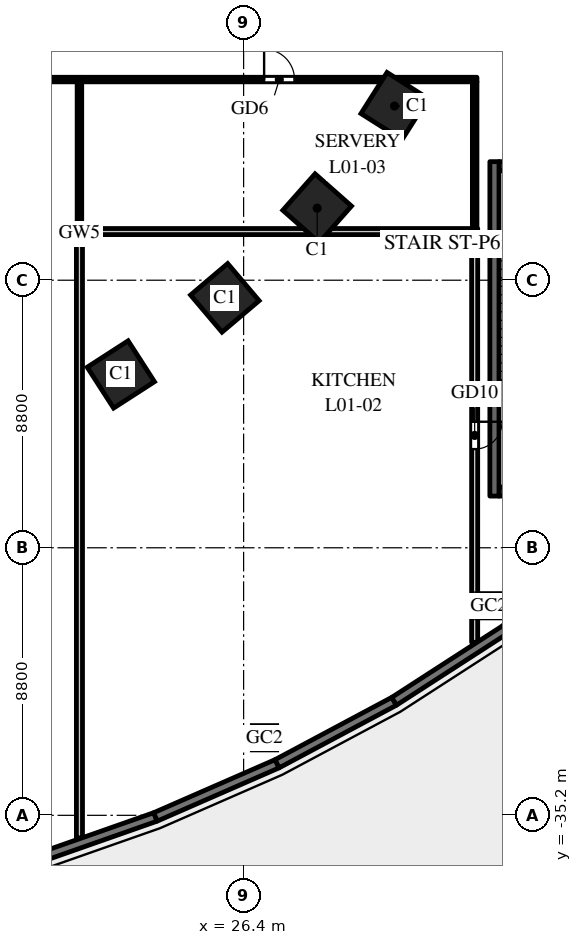
"""IFC4 building model, lengths in metres.
Left out: names, types, materials, properties, quantities, classifications, styles, units other than length and angle.
Written with IfcOpenShell. Run it as: python <this file> out.ifc"""

import sys

from ifc_helpers import new_model, si_unit, direction, frame, frame_2d, origin, origin_2d, place, context, subcontext, project, spatial, rectangle, hollow_rectangle, i_section, extrude, element, fill, save


model = new_model("IFC4")
c1 = context("Model", 3, precision=1e-05, world=origin(), true_north=direction((0.0, 1.0)))
c2 = subcontext(c1, "Body", "Model", "MODEL_VIEW")
j1 = project(units=[si_unit("LENGTHUNIT", "METRE"), si_unit("PLANEANGLEUNIT", "RADIAN")], contexts=[c1])
p1 = place(None, origin())
s1 = spatial("IfcSite", under=j1, at=p1, CompositionType="ELEMENT")
p2 = place(p1, origin())
s2 = spatial("IfcBuilding", under=s1, at=p2, CompositionType="ELEMENT")
p3 = place(p2, frame((0.0, 0.0, 7.5)))
s3 = spatial("IfcBuildingStorey", under=s2, at=p3, CompositionType="ELEMENT", Elevation=7.5)
for number, where, z_axis, x_axis in (
    (1, (22.362, -20.7, 0.0), (0.0, 0.0, 1.0), (0.84, 0.542, 0.0)),
    (2, (25.783, -18.18, 0.0), (0.0, 0.0, 1.0), (0.763, 0.646, 0.0)),
    (3, (28.819, -15.23, 0.0), (0.0, 0.0, 1.0), (0.663, 0.749, 0.0)),
    (4, (31.365, -11.871, 0.0), (0.0, 0.0, 1.0), (0.535, 0.845, 0.0)),
):
    element("IfcColumn", number, at=place(p3, frame(where, z_axis=z_axis, x_axis=x_axis)), inside=s3, PredefinedType="COLUMN", context=c2, shape_type="SweptSolid", body=[
        extrude(rectangle(XDim=1.6, YDim=1.6, at=origin_2d()), origin(), (0.0, 0.0, 1.0), 6.0),
    ])
for number, where, z_axis, x_axis in (
    (5, (27.087, -32.648, 0.0), (0.0, 0.0, 1.0), (1.0, 0.0, 0.0)),
    (6, (34.465, -28.307, 0.0), (0.0, 0.0, 1.0), (1.0, 0.0, 0.0)),
):
    element("IfcColumn", number, at=place(p3, frame(where, z_axis=z_axis, x_axis=x_axis)), inside=s3, PredefinedType="COLUMN", context=c2, shape_type="SweptSolid", body=[
        extrude(hollow_rectangle(XDim=0.8, YDim=0.8, WallThickness=0.04, at=origin_2d()), origin(), (0.0, 0.0, 1.0), 6.0),
    ])
p4 = place(p3, frame((21.0, -16.065, 0.0), z_axis=(0.0, 0.0, 1.0), x_axis=(0.0, -1.0, 0.0)))
e7 = element("IfcWall", 7, at=p4, inside=s3, PredefinedType="PARTITIONING", context=c2, shape_type="SweptSolid", body=[
    extrude(rectangle(XDim=19.876, YDim=0.2, at=frame_2d((9.938, 0.0))), origin(), (0.0, 0.0, 1.0), 4.75),
])
p5 = place(p3, frame((21.0, -11.075, 0.0), z_axis=(0.0, 0.0, 1.0), x_axis=(0.0, -1.0, 0.0)))
e8 = element("IfcWall", 8, at=p5, inside=s3, PredefinedType="PARTITIONING", context=c2, shape_type="SweptSolid", body=[
    extrude(rectangle(XDim=4.835, YDim=0.15, at=frame_2d((2.417, 0.0))), origin(), (0.0, 0.0, 1.0), 4.7),
])
p6 = place(p3, frame((-30.075, -11.0, 0.0), z_axis=(0.0, 0.0, 1.0), x_axis=(1.0, 0.0, 0.0)))
e9 = element("IfcWall", 9, at=p6, inside=s3, PredefinedType="PARTITIONING", context=c2, shape_type="SweptSolid", body=[
    extrude(rectangle(XDim=51.15, YDim=0.15, at=frame_2d((25.575, 0.0))), origin(), (0.0, 0.0, 1.0), 4.7),
])
p7 = place(p6, frame((24.875, 0.0, 0.0)))
e10 = element("IfcOpeningElement", 10, at=p7, cuts=e9, PredefinedType="OPENING", context=c2, shape_type="SweptSolid", body=[
    extrude(rectangle(XDim=1.4, YDim=2.1, at=frame_2d((0.7, 1.05))), frame((0.0, 0.085, 0.0), z_axis=(0.0, -1.0, 0.0), x_axis=(1.0, 0.0, 0.0)), (0.0, 0.0, 1.0), 0.17),
])
p8 = place(p3, frame((21.1, -16.0, 0.0), z_axis=(0.0, 0.0, 1.0), x_axis=(1.0, 0.0, 0.0)))
e11 = element("IfcWall", 11, at=p8, inside=s3, PredefinedType="PARTITIONING", context=c2, shape_type="SweptSolid", body=[
    extrude(rectangle(XDim=12.8, YDim=0.2, at=frame_2d((6.4, 0.0))), origin(), (0.0, 0.0, 1.0), 4.85),
])
p9 = place(p3, frame((34.0, -15.9, 0.0), z_axis=(0.0, 0.0, 1.0), x_axis=(0.0, -1.0, 0.0)))
e12 = element("IfcWall", 12, at=p9, inside=s3, PredefinedType="PARTITIONING", context=c2, shape_type="SweptSolid", body=[
    extrude(rectangle(XDim=13.61, YDim=0.2, at=frame_2d((6.805, 0.0))), origin(), (0.0, 0.0, 1.0), 4.75),
])
p10 = place(p9, frame((6.355, 0.0, 0.0)))
e13 = element("IfcOpeningElement", 13, at=p10, cuts=e12, PredefinedType="OPENING", context=c2, shape_type="SweptSolid", body=[
    extrude(rectangle(XDim=0.9, YDim=2.1, at=frame_2d((0.45, 1.05))), frame((0.0, 0.11, 0.0), z_axis=(0.0, -1.0, 0.0), x_axis=(1.0, 0.0, 0.0)), (0.0, 0.0, 1.0), 0.22),
])
p11 = place(p3, frame((21.074, -11.0, 0.0), z_axis=(0.0, 0.0, 1.0), x_axis=(1.0, 0.0, 0.0)))
e14 = element("IfcWall", 14, at=p11, inside=s3, PredefinedType="PARTITIONING", context=c2, shape_type="SweptSolid", body=[
    extrude(rectangle(XDim=13.001, YDim=0.15, at=frame_2d((6.5, 0.0))), origin(), (0.0, 0.0, 1.0), 4.75),
])
p12 = place(p11, frame((6.001, 0.0, 0.0)))
e15 = element("IfcOpeningElement", 15, at=p12, cuts=e14, PredefinedType="OPENING", context=c2, shape_type="SweptSolid", body=[
    extrude(rectangle(XDim=1.0, YDim=2.1, at=frame_2d((0.5, 1.05))), frame((0.0, 0.085, 0.0), z_axis=(0.0, -1.0, 0.0), x_axis=(1.0, 0.0, 0.0)), (0.0, 0.0, 1.0), 0.17),
])
p13 = place(p3, frame((34.0, -11.075, 0.0), z_axis=(0.0, 0.0, 1.0), x_axis=(0.0, -1.0, 0.0)))
e16 = element("IfcWall", 16, at=p13, inside=s3, PredefinedType="PARTITIONING", context=c2, shape_type="SweptSolid", body=[
    extrude(rectangle(XDim=4.825, YDim=0.15, at=frame_2d((2.413, 0.0))), origin(), (0.0, 0.0, 1.0), 4.75),
])
p14 = place(p3, frame((19.379, -36.699, 0.0), z_axis=(0.0, 0.0, 1.0), x_axis=(0.943526738033, 0.331296384853, 0.0)))
e17 = element("IfcWall", 17, at=p14, inside=s3, PredefinedType="SOLIDWALL", context=c2, shape_type="SweptSolid", body=[
    extrude(rectangle(XDim=4.368, YDim=0.3, at=frame_2d((2.184, 0.0))), origin(), (0.0, 0.0, 1.0), 5.75),
])
p15 = place(p14, frame((0.984, 0.0, 1.0)))
e18 = element("IfcOpeningElement", 18, at=p15, cuts=e17, PredefinedType="OPENING", context=c2, shape_type="SweptSolid", body=[
    extrude(rectangle(XDim=2.4, YDim=3.0, at=frame_2d((1.2, 1.5))), frame((0.0, 0.16, 0.0), z_axis=(0.0, -1.0, 0.0), x_axis=(1.0, 0.0, 0.0)), (0.0, 0.0, 1.0), 0.32),
])
p16 = place(p3, frame((23.5, -35.252, 0.0), z_axis=(0.0, 0.0, 1.0), x_axis=(0.916336904548, 0.400408138483, 0.0)))
e19 = element("IfcWall", 19, at=p16, inside=s3, PredefinedType="SOLIDWALL", context=c2, shape_type="SweptSolid", body=[
    extrude(rectangle(XDim=4.366, YDim=0.3, at=frame_2d((2.183, 0.0))), origin(), (0.0, 0.0, 1.0), 5.75),
])
p17 = place(p16, frame((0.983, 0.0, 1.0)))
e20 = element("IfcOpeningElement", 20, at=p17, cuts=e19, PredefinedType="OPENING", context=c2, shape_type="SweptSolid", body=[
    extrude(rectangle(XDim=2.4, YDim=3.0, at=frame_2d((1.2, 1.5))), frame((0.0, 0.16, 0.0), z_axis=(0.0, -1.0, 0.0), x_axis=(1.0, 0.0, 0.0)), (0.0, 0.0, 1.0), 0.32),
])
p18 = place(p3, frame((27.501, -33.504, 0.0), z_axis=(0.0, 0.0, 1.0), x_axis=(0.882159305704, 0.47095112205, 0.0)))
e21 = element("IfcWall", 21, at=p18, inside=s3, PredefinedType="SOLIDWALL", context=c2, shape_type="SweptSolid", body=[
    extrude(rectangle(XDim=4.365, YDim=0.3, at=frame_2d((2.182, 0.0))), origin(), (0.0, 0.0, 1.0), 5.75),
])
p19 = place(p18, frame((0.982, 0.0, 1.0)))
e22 = element("IfcOpeningElement", 22, at=p19, cuts=e21, PredefinedType="OPENING", context=c2, shape_type="SweptSolid", body=[
    extrude(rectangle(XDim=2.4, YDim=3.0, at=frame_2d((1.2, 1.5))), frame((0.0, 0.16, 0.0), z_axis=(0.0, -1.0, 0.0), x_axis=(1.0, 0.0, 0.0)), (0.0, 0.0, 1.0), 0.32),
])
p20 = place(p3, frame((31.352, -31.448, 0.0), z_axis=(0.0, 0.0, 1.0), x_axis=(0.840047348843, 0.542513088969, 0.0)))
e23 = element("IfcWall", 23, at=p20, inside=s3, PredefinedType="SOLIDWALL", context=c2, shape_type="SweptSolid", body=[
    extrude(rectangle(XDim=4.362, YDim=0.3, at=frame_2d((2.181, 0.0))), origin(), (0.0, 0.0, 1.0), 5.75),
])
p21 = place(p20, frame((0.671, 0.0, 1.0)))
e24 = element("IfcOpeningElement", 24, at=p21, cuts=e23, PredefinedType="OPENING", context=c2, shape_type="SweptSolid", body=[
    extrude(rectangle(XDim=2.4, YDim=3.0, at=frame_2d((1.2, 1.5))), frame((0.0, 0.16, 0.0), z_axis=(0.0, -1.0, 0.0), x_axis=(1.0, 0.0, 0.0)), (0.0, 0.0, 1.0), 0.32),
])
p22 = place(p3, frame((34.65, -24.7, 0.0), z_axis=(0.0, 0.0, 1.0), x_axis=(0.0, 1.0, 0.0)))
e25 = element("IfcWall", 25, at=p22, inside=s3, PredefinedType="SHEAR", context=c2, shape_type="SweptSolid", body=[
    extrude(rectangle(XDim=11.0, YDim=0.3, at=frame_2d((5.5, 0.0))), origin(), (0.0, 0.0, 1.0), 5.75),
])
p23 = place(p3, frame((34.8, -24.55, 0.0), z_axis=(0.0, 0.0, 1.0), x_axis=(1.0, 0.0, 0.0)))
e26 = element("IfcWall", 26, at=p23, inside=s3, PredefinedType="SHEAR", context=c2, shape_type="SweptSolid", body=[
    extrude(rectangle(XDim=4.95, YDim=0.3, at=frame_2d((2.475, 0.0))), origin(), (0.0, 0.0, 1.0), 5.75),
])
p24 = place(p3, frame((34.8, -13.85, 0.0), z_axis=(0.0, 0.0, 1.0), x_axis=(1.0, 0.0, 0.0)))
e27 = element("IfcWall", 27, at=p24, inside=s3, PredefinedType="SHEAR", context=c2, shape_type="SweptSolid", body=[
    extrude(rectangle(XDim=4.95, YDim=0.3, at=frame_2d((2.475, 0.0))), origin(), (0.0, 0.0, 1.0), 5.75),
])
p25 = place(p24, frame((1.475, 0.0, 0.0)))
e28 = element("IfcOpeningElement", 28, at=p25, cuts=e27, PredefinedType="OPENING", context=c2, shape_type="SweptSolid", body=[
    extrude(rectangle(XDim=2.0, YDim=2.1, at=frame_2d((1.0, 1.05))), frame((0.0, 0.16, 0.0), z_axis=(0.0, -1.0, 0.0), x_axis=(1.0, 0.0, 0.0)), (0.0, 0.0, 1.0), 0.32),
])
p26 = place(p2, origin())
s4 = spatial("IfcBuildingStorey", under=s2, at=p26, CompositionType="ELEMENT", Elevation=0.0)
for number, where, z_axis, x_axis in (
    (29, (23.835, -35.542, -0.15), (0.0, 0.0, 1.0), (1.0, 0.0, 0.0)),
    (30, (30.27, -33.953, -0.15), (0.0, 0.0, 1.0), (1.0, 0.0, 0.0)),
):
    element("IfcColumn", number, at=place(p26, frame(where, z_axis=z_axis, x_axis=x_axis)), inside=s4, PredefinedType="COLUMN", context=c2, shape_type="SweptSolid", body=[
        extrude(i_section(OverallWidth=0.3, OverallDepth=0.3, WebThickness=0.011, FlangeThickness=0.019, FilletRadius=0.027, at=origin_2d()), origin(), (0.0, 0.0, 1.0), 12.3),
    ])
p27 = place(p10, origin())
e31 = element("IfcDoor", 31, at=p27, inside=s3, OperationType="SINGLE_SWING_LEFT", PredefinedType="DOOR", context=c2, shape_type="SweptSolid", body=[
    extrude(rectangle(XDim=0.9, YDim=2.1, at=frame_2d((0.45, 1.05))), frame((0.0, 0.025, 0.0), z_axis=(0.0, -1.0, 0.0), x_axis=(1.0, 0.0, 0.0)), (0.0, 0.0, 1.0), 0.05),
])
fill(e13, e31)
p28 = place(p12, origin())
e32 = element("IfcDoor", 32, at=p28, inside=s3, OperationType="SINGLE_SWING_LEFT", PredefinedType="DOOR", context=c2, shape_type="SweptSolid", body=[
    extrude(rectangle(XDim=1.0, YDim=2.1, at=frame_2d((0.5, 1.05))), frame((0.0, 0.025, 0.0), z_axis=(0.0, -1.0, 0.0), x_axis=(1.0, 0.0, 0.0)), (0.0, 0.0, 1.0), 0.05),
])
fill(e15, e32)
p29 = place(p15, origin())
e33 = element("IfcWindow", 33, at=p29, inside=s3, PartitioningType="SINGLE_PANEL", PredefinedType="WINDOW", context=c2, shape_type="SweptSolid", body=[
    extrude(rectangle(XDim=2.4, YDim=3.0, at=frame_2d((1.2, 1.5))), frame((0.0, 0.03, 0.0), z_axis=(0.0, -1.0, 0.0), x_axis=(1.0, 0.0, 0.0)), (0.0, 0.0, 1.0), 0.06),
])
fill(e18, e33)
p30 = place(p17, origin())
e34 = element("IfcWindow", 34, at=p30, inside=s3, PartitioningType="SINGLE_PANEL", PredefinedType="WINDOW", context=c2, shape_type="SweptSolid", body=[
    extrude(rectangle(XDim=2.4, YDim=3.0, at=frame_2d((1.2, 1.5))), frame((0.0, 0.03, 0.0), z_axis=(0.0, -1.0, 0.0), x_axis=(1.0, 0.0, 0.0)), (0.0, 0.0, 1.0), 0.06),
])
fill(e20, e34)
p31 = place(p19, origin())
e35 = element("IfcWindow", 35, at=p31, inside=s3, PartitioningType="SINGLE_PANEL", PredefinedType="WINDOW", context=c2, shape_type="SweptSolid", body=[
    extrude(rectangle(XDim=2.4, YDim=3.0, at=frame_2d((1.2, 1.5))), frame((0.0, 0.03, 0.0), z_axis=(0.0, -1.0, 0.0), x_axis=(1.0, 0.0, 0.0)), (0.0, 0.0, 1.0), 0.06),
])
fill(e22, e35)
p32 = place(p21, origin())
e36 = element("IfcWindow", 36, at=p32, inside=s3, PartitioningType="SINGLE_PANEL", PredefinedType="WINDOW", context=c2, shape_type="SweptSolid", body=[
    extrude(rectangle(XDim=2.4, YDim=3.0, at=frame_2d((1.2, 1.5))), frame((0.0, 0.03, 0.0), z_axis=(0.0, -1.0, 0.0), x_axis=(1.0, 0.0, 0.0)), (0.0, 0.0, 1.0), 0.06),
])
fill(e24, e36)
save(model, sys.argv[1])
